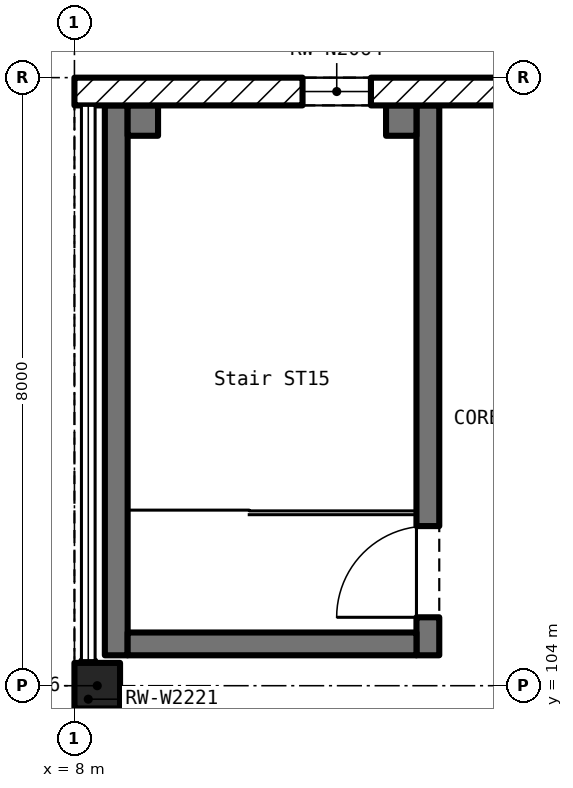
"""IFC4 building model, lengths in metres.
Left out: names, types, materials, properties, quantities, classifications, styles, units other than length and angle.
Written with IfcOpenShell. Run it as: python <this file> out.ifc"""

import sys

from ifc_helpers import new_model, si_unit, direction, frame, frame_2d, origin, origin_2d, place, context, subcontext, project, spatial, rectangle, extrude, element, fill, save


model = new_model("IFC4")
c1 = context("Model", 3, precision=1e-05, world=origin(), true_north=direction((0.0, 1.0)))
c2 = subcontext(c1, "Body", "Model", "MODEL_VIEW")
j1 = project(units=[si_unit("LENGTHUNIT", "METRE"), si_unit("PLANEANGLEUNIT", "RADIAN")], contexts=[c1])
p1 = place(None, origin())
s1 = spatial("IfcSite", under=j1, at=p1, CompositionType="ELEMENT")
p2 = place(p1, origin())
s2 = spatial("IfcBuilding", under=s1, at=p2, CompositionType="ELEMENT")
p3 = place(p2, frame((0.0, 0.0, 22.5)))
s3 = spatial("IfcBuildingStorey", under=s2, at=p3, CompositionType="ELEMENT", Elevation=22.5)
p4 = place(p3, frame((8.3, 104.0, 0.0), z_axis=(0.0, 0.0, 1.0), x_axis=(1.0, 0.0, 0.0)))
e1 = element("IfcColumn", 1, at=p4, inside=s3, PredefinedType="COLUMN", context=c2, shape_type="SweptSolid", body=[
    extrude(rectangle(XDim=0.6, YDim=0.6, at=origin_2d()), origin(), (0.0, 0.0, 1.0), 5.5),
])
p5 = place(p3, frame((15.701, 111.817, 0.0), z_axis=(0.0, 0.0, 1.0), x_axis=(-1.0, 0.0, 0.0)))
e2 = element("IfcWall", 2, at=p5, inside=s3, PredefinedType="SOLIDWALL", context=c2, shape_type="SweptSolid", body=[
    extrude(rectangle(XDim=7.701, YDim=0.365, at=frame_2d((3.851, 0.0))), origin(), (0.0, 0.0, 1.0), 4.45),
])
p6 = place(p5, frame((3.8, 0.0, 1.0)))
e3 = element("IfcOpeningElement", 3, at=p6, cuts=e2, PredefinedType="OPENING", context=c2, shape_type="SweptSolid", body=[
    extrude(rectangle(XDim=0.9, YDim=2.0, at=frame_2d((0.45, 1.0))), frame((0.0, 0.195, 0.0), z_axis=(0.0, -1.0, 0.0), x_axis=(1.0, 0.0, 0.0)), (0.0, 0.0, 1.0), 0.389),
])
p7 = place(p3, frame((12.65, 104.4, 0.0), z_axis=(0.0, 0.0, 1.0), x_axis=(0.0, 1.0, 0.0)))
e4 = element("IfcWall", 4, at=p7, inside=s3, PredefinedType="SOLIDWALL", context=c2, shape_type="SweptSolid", body=[
    extrude(rectangle(XDim=7.235, YDim=0.3, at=frame_2d((3.618, 0.0))), origin(), (0.0, 0.0, 1.0), 5.25),
])
p8 = place(p7, frame((0.5, 0.0, 0.0)))
e5 = element("IfcOpeningElement", 5, at=p8, cuts=e4, PredefinedType="OPENING", context=c2, shape_type="SweptSolid", body=[
    extrude(rectangle(XDim=1.2, YDim=2.1, at=frame_2d((0.6, 1.05))), frame((0.0, 0.162, 0.0), z_axis=(0.0, -1.0, 0.0), x_axis=(1.0, 0.0, 0.0)), (0.0, 0.0, 1.0), 0.324),
])
p9 = place(p3, frame((8.55, 111.635, 0.0), z_axis=(0.0, 0.0, 1.0), x_axis=(0.0, -1.0, 0.0)))
e6 = element("IfcWall", 6, at=p9, inside=s3, PredefinedType="SOLIDWALL", context=c2, shape_type="SweptSolid", body=[
    extrude(rectangle(XDim=7.235, YDim=0.3, at=frame_2d((3.618, 0.0))), origin(), (0.0, 0.0, 1.0), 5.25),
])
p10 = place(p3, frame((8.7, 104.55, 0.0), z_axis=(0.0, 0.0, 1.0), x_axis=(1.0, 0.0, 0.0)))
e7 = element("IfcWall", 7, at=p10, inside=s3, PredefinedType="SOLIDWALL", context=c2, shape_type="SweptSolid", body=[
    extrude(rectangle(XDim=3.8, YDim=0.3, at=frame_2d((1.9, 0.0))), origin(), (0.0, 0.0, 1.0), 5.25),
])
p11 = place(p3, frame((12.5, 111.435, 0.0), z_axis=(0.0, 0.0, 1.0), x_axis=(-1.0, 0.0, 0.0)))
e8 = element("IfcWall", 8, at=p11, inside=s3, PredefinedType="SOLIDWALL", context=c2, shape_type="SweptSolid", body=[
    extrude(rectangle(XDim=0.4, YDim=0.4, at=frame_2d((0.2, 0.0))), origin(), (0.0, 0.0, 1.0), 5.25),
])
p12 = place(p3, frame((9.1, 111.435, 0.0), z_axis=(0.0, 0.0, 1.0), x_axis=(-1.0, 0.0, 0.0)))
e9 = element("IfcWall", 9, at=p12, inside=s3, PredefinedType="SOLIDWALL", context=c2, shape_type="SweptSolid", body=[
    extrude(rectangle(XDim=0.4, YDim=0.4, at=frame_2d((0.2, 0.0))), origin(), (0.0, 0.0, 1.0), 5.25),
])
for number, where, z_axis, x_axis in (
    (10, (8.182, 104.33, 0.0), (0.0, 0.0, 1.0), (0.0, -1.0, 0.0)),
    (11, (8.182, 103.67, 0.0), (0.0, 0.0, 1.0), (0.0, 1.0, 0.0)),
):
    element("IfcWall", number, at=place(p3, frame(where, z_axis=z_axis, x_axis=x_axis)), inside=s3, PredefinedType="SOLIDWALL", context=c2, shape_type="SweptSolid", body=[
        extrude(rectangle(XDim=0.305, YDim=0.18, at=frame_2d((0.153, 0.0))), origin(), (0.0, 0.0, 1.0), 3.6),
    ])
p13 = place(p8, origin())
e12 = element("IfcDoor", 12, at=p13, inside=s3, OperationType="SINGLE_SWING_LEFT", PredefinedType="DOOR", context=c2, shape_type="SweptSolid", body=[
    extrude(rectangle(XDim=1.2, YDim=2.1, at=frame_2d((0.6, 1.05))), frame((0.0, 0.025, 0.0), z_axis=(0.0, -1.0, 0.0), x_axis=(1.0, 0.0, 0.0)), (0.0, 0.0, 1.0), 0.05),
])
fill(e5, e12)
p14 = place(p6, origin())
e13 = element("IfcWindow", 13, at=p14, inside=s3, PartitioningType="SINGLE_PANEL", PredefinedType="WINDOW", context=c2, shape_type="SweptSolid", body=[
    extrude(rectangle(XDim=0.9, YDim=2.0, at=frame_2d((0.45, 1.0))), frame((0.0, 0.03, 0.0), z_axis=(0.0, -1.0, 0.0), x_axis=(1.0, 0.0, 0.0)), (0.0, 0.0, 1.0), 0.06),
])
fill(e3, e13)
save(model, sys.argv[1])
